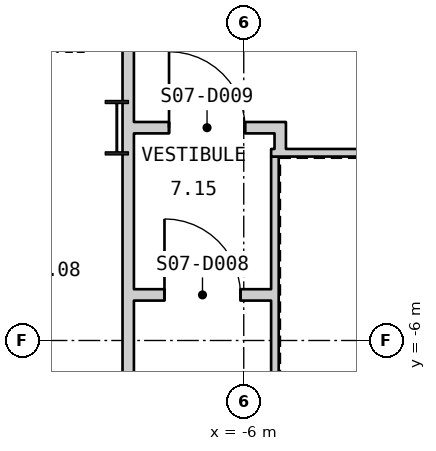
"""IFC4 building model, lengths in metres.
Left out: names, types, materials, properties, quantities, classifications, styles, units other than length and angle.
Written with IfcOpenShell. Run it as: python <this file> out.ifc"""

import sys

from ifc_helpers import new_model, si_unit, direction, frame, frame_2d, origin, origin_2d, place, context, subcontext, project, spatial, polyline, rectangle, i_section, outline, extrude, element, fill, save


model = new_model("IFC4")
c1 = context("Model", 3, precision=1e-05, world=origin(), true_north=direction((0.0, 1.0)))
c2 = subcontext(c1, "Body", "Model", "MODEL_VIEW")
j1 = project(units=[si_unit("LENGTHUNIT", "METRE"), si_unit("PLANEANGLEUNIT", "RADIAN")], contexts=[c1])
p1 = place(None, origin())
s1 = spatial("IfcSite", under=j1, at=p1, CompositionType="ELEMENT")
p2 = place(p1, origin())
s2 = spatial("IfcBuilding", under=s1, at=p2, CompositionType="ELEMENT")
p3 = place(p2, frame((0.0, 0.0, 97.8)))
s3 = spatial("IfcBuildingStorey", under=s2, at=p3, CompositionType="ELEMENT", Elevation=97.8)
p4 = place(p3, frame((-7.67, -3.2, 0.0), z_axis=(0.0, 0.0, 1.0), x_axis=(1.0, 0.0, 0.0)))
e1 = element("IfcColumn", 1, at=p4, inside=s3, PredefinedType="COLUMN", context=c2, shape_type="SweptSolid", body=[
    extrude(i_section(OverallWidth=0.304, OverallDepth=0.716, WebThickness=0.021, FlangeThickness=0.04, at=origin_2d()), origin(), (0.0, 0.0, 1.0), 4.5),
])
p5 = place(p3, frame((-27.775, 11.479, -0.18), z_axis=(0.0, 0.0, 1.0), x_axis=(0.500000711659, -0.866024992908, 0.0)))
e2 = element("IfcWall", 2, at=p5, inside=s3, PredefinedType="SOLIDWALL", context=c2, shape_type="SweptSolid", body=[
    extrude(outline(polyline([(-0.13, -0.225), (45.87, -0.225), (45.61, 0.225), (0.13, 0.225), (-0.13, -0.225)])), origin(), (0.0, 0.0, 1.0), 4.28),
])
p6 = place(p5, frame((1.424, 0.0, 1.08)))
e3 = element("IfcOpeningElement", 3, at=p6, cuts=e2, PredefinedType="OPENING", context=c2, shape_type="SweptSolid", body=[
    extrude(rectangle(XDim=2.4, YDim=2.6, at=frame_2d((1.2, 1.3))), frame((0.0, 0.235, 0.0), z_axis=(0.0, -1.0, 0.0), x_axis=(1.0, 0.0, 0.0)), (0.0, 0.0, 1.0), 0.47),
])
p7 = place(p5, frame((5.893, 0.0, 1.08)))
e4 = element("IfcOpeningElement", 4, at=p7, cuts=e2, PredefinedType="OPENING", context=c2, shape_type="SweptSolid", body=[
    extrude(rectangle(XDim=2.4, YDim=2.6, at=frame_2d((1.2, 1.3))), frame((0.0, 0.235, 0.0), z_axis=(0.0, -1.0, 0.0), x_axis=(1.0, 0.0, 0.0)), (0.0, 0.0, 1.0), 0.47),
])
p8 = place(p5, frame((10.401, 0.0, 1.08)))
e5 = element("IfcOpeningElement", 5, at=p8, cuts=e2, PredefinedType="OPENING", context=c2, shape_type="SweptSolid", body=[
    extrude(rectangle(XDim=2.4, YDim=2.6, at=frame_2d((1.2, 1.3))), frame((0.0, 0.235, 0.0), z_axis=(0.0, -1.0, 0.0), x_axis=(1.0, 0.0, 0.0)), (0.0, 0.0, 1.0), 0.47),
])
p9 = place(p5, frame((14.909, 0.0, 1.08)))
e6 = element("IfcOpeningElement", 6, at=p9, cuts=e2, PredefinedType="OPENING", context=c2, shape_type="SweptSolid", body=[
    extrude(rectangle(XDim=2.4, YDim=2.6, at=frame_2d((1.2, 1.3))), frame((0.0, 0.235, 0.0), z_axis=(0.0, -1.0, 0.0), x_axis=(1.0, 0.0, 0.0)), (0.0, 0.0, 1.0), 0.47),
])
p10 = place(p5, frame((19.416, 0.0, 1.08)))
e7 = element("IfcOpeningElement", 7, at=p10, cuts=e2, PredefinedType="OPENING", context=c2, shape_type="SweptSolid", body=[
    extrude(rectangle(XDim=2.4, YDim=2.6, at=frame_2d((1.2, 1.3))), frame((0.0, 0.235, 0.0), z_axis=(0.0, -1.0, 0.0), x_axis=(1.0, 0.0, 0.0)), (0.0, 0.0, 1.0), 0.47),
])
p11 = place(p5, frame((23.924, 0.0, 1.08)))
e8 = element("IfcOpeningElement", 8, at=p11, cuts=e2, PredefinedType="OPENING", context=c2, shape_type="SweptSolid", body=[
    extrude(rectangle(XDim=2.4, YDim=2.6, at=frame_2d((1.2, 1.3))), frame((0.0, 0.235, 0.0), z_axis=(0.0, -1.0, 0.0), x_axis=(1.0, 0.0, 0.0)), (0.0, 0.0, 1.0), 0.47),
])
p12 = place(p5, frame((28.431, 0.0, 1.08)))
e9 = element("IfcOpeningElement", 9, at=p12, cuts=e2, PredefinedType="OPENING", context=c2, shape_type="SweptSolid", body=[
    extrude(rectangle(XDim=2.4, YDim=2.6, at=frame_2d((1.2, 1.3))), frame((0.0, 0.235, 0.0), z_axis=(0.0, -1.0, 0.0), x_axis=(1.0, 0.0, 0.0)), (0.0, 0.0, 1.0), 0.47),
])
p13 = place(p5, frame((32.939, 0.0, 1.08)))
e10 = element("IfcOpeningElement", 10, at=p13, cuts=e2, PredefinedType="OPENING", context=c2, shape_type="SweptSolid", body=[
    extrude(rectangle(XDim=2.4, YDim=2.6, at=frame_2d((1.2, 1.3))), frame((0.0, 0.235, 0.0), z_axis=(0.0, -1.0, 0.0), x_axis=(1.0, 0.0, 0.0)), (0.0, 0.0, 1.0), 0.47),
])
p14 = place(p5, frame((37.447, 0.0, 1.08)))
e11 = element("IfcOpeningElement", 11, at=p14, cuts=e2, PredefinedType="OPENING", context=c2, shape_type="SweptSolid", body=[
    extrude(rectangle(XDim=2.4, YDim=2.6, at=frame_2d((1.2, 1.3))), frame((0.0, 0.235, 0.0), z_axis=(0.0, -1.0, 0.0), x_axis=(1.0, 0.0, 0.0)), (0.0, 0.0, 1.0), 0.47),
])
p15 = place(p5, frame((41.916, 0.0, 1.08)))
e12 = element("IfcOpeningElement", 12, at=p15, cuts=e2, PredefinedType="OPENING", context=c2, shape_type="SweptSolid", body=[
    extrude(rectangle(XDim=2.4, YDim=2.6, at=frame_2d((1.2, 1.3))), frame((0.0, 0.235, 0.0), z_axis=(0.0, -1.0, 0.0), x_axis=(1.0, 0.0, 0.0)), (0.0, 0.0, 1.0), 0.47),
])
p16 = place(p3, frame((5.64, -3.53, 0.0), z_axis=(0.0, 0.0, 1.0), x_axis=(-1.0, 0.0, 0.0)))
e13 = element("IfcWall", 13, at=p16, inside=s3, PredefinedType="PARTITIONING", context=c2, shape_type="SweptSolid", body=[
    extrude(rectangle(XDim=11.28, YDim=0.1, at=frame_2d((5.64, 0.0))), origin(), (0.0, 0.0, 1.0), 4.3),
])
p17 = place(p3, frame((-5.59, -3.58, 0.0), z_axis=(0.0, 0.0, 1.0), x_axis=(0.0, -1.0, 0.0)))
e14 = element("IfcWall", 14, at=p17, inside=s3, PredefinedType="PARTITIONING", context=c2, shape_type="SweptSolid", body=[
    extrude(rectangle(XDim=8.04, YDim=0.1, at=frame_2d((4.02, 0.0))), origin(), (0.0, 0.0, 1.0), 4.3),
])
p18 = place(p3, frame((-7.52, -13.675, 0.0), z_axis=(0.0, 0.0, 1.0), x_axis=(0.0, 1.0, 0.0)))
e15 = element("IfcWall", 15, at=p18, inside=s3, PredefinedType="PARTITIONING", context=c2, shape_type="SweptSolid", body=[
    extrude(rectangle(XDim=10.167, YDim=0.15, at=frame_2d((5.083, 0.0))), origin(), (0.0, 0.0, 1.0), 3.7),
])
p19 = place(p18, frame((2.079, 0.0, 0.0)))
e16 = element("IfcOpeningElement", 16, at=p19, cuts=e15, PredefinedType="OPENING", context=c2, shape_type="SweptSolid", body=[
    extrude(rectangle(XDim=1.0, YDim=2.1, at=frame_2d((0.5, 1.05))), frame((0.0, 0.085, 0.0), z_axis=(0.0, -1.0, 0.0), x_axis=(1.0, 0.0, 0.0)), (0.0, 0.0, 1.0), 0.17),
])
p20 = place(p3, frame((-7.52, -3.508, 0.0), z_axis=(0.0, 0.0, 1.0), x_axis=(0.0, 1.0, 0.0)))
e17 = element("IfcWall", 17, at=p20, inside=s3, PredefinedType="PARTITIONING", context=c2, shape_type="SweptSolid", body=[
    extrude(rectangle(XDim=1.704, YDim=0.15, at=frame_2d((0.852, 0.0))), origin(), (0.0, 0.0, 1.0), 4.3),
])
p21 = place(p3, frame((-7.445, -5.4, 0.0), z_axis=(0.0, 0.0, 1.0), x_axis=(1.0, 0.0, 0.0)))
e18 = element("IfcWall", 18, at=p21, inside=s3, PredefinedType="PARTITIONING", context=c2, shape_type="SweptSolid", body=[
    extrude(rectangle(XDim=1.805, YDim=0.15, at=frame_2d((0.902, 0.0))), origin(), (0.0, 0.0, 1.0), 4.3),
])
p22 = place(p21, frame((0.402, 0.0, 0.0)))
e19 = element("IfcOpeningElement", 19, at=p22, cuts=e18, PredefinedType="OPENING", context=c2, shape_type="SweptSolid", body=[
    extrude(rectangle(XDim=1.0, YDim=2.1, at=frame_2d((0.5, 1.05))), frame((0.0, 0.085, 0.0), z_axis=(0.0, -1.0, 0.0), x_axis=(1.0, 0.0, 0.0)), (0.0, 0.0, 1.0), 0.17),
])
p23 = place(p3, frame((-7.445, -3.2, 0.0), z_axis=(0.0, 0.0, 1.0), x_axis=(1.0, 0.0, 0.0)))
e20 = element("IfcWall", 20, at=p23, inside=s3, PredefinedType="PARTITIONING", context=c2, shape_type="SweptSolid", body=[
    extrude(rectangle(XDim=2.0, YDim=0.15, at=frame_2d((1.0, 0.0))), origin(), (0.0, 0.0, 1.0), 3.39),
])
p24 = place(p23, frame((0.462, 0.0, 0.0)))
e21 = element("IfcOpeningElement", 21, at=p24, cuts=e20, PredefinedType="OPENING", context=c2, shape_type="SweptSolid", body=[
    extrude(rectangle(XDim=1.0, YDim=2.1, at=frame_2d((0.5, 1.05))), frame((0.0, 0.085, 0.0), z_axis=(0.0, -1.0, 0.0), x_axis=(1.0, 0.0, 0.0)), (0.0, 0.0, 1.0), 0.17),
])
p25 = place(p3, frame((-5.52, -3.48, 0.0), z_axis=(0.0, 0.0, 1.0), x_axis=(0.0, 1.0, 0.0)))
e22 = element("IfcWall", 22, at=p25, inside=s3, PredefinedType="PARTITIONING", context=c2, shape_type="SweptSolid", body=[
    extrude(rectangle(XDim=0.205, YDim=0.15, at=frame_2d((0.102, 0.0))), origin(), (0.0, 0.0, 1.0), 4.3),
])
p26 = place(p22, origin())
e23 = element("IfcDoor", 23, at=p26, inside=s3, OperationType="SINGLE_SWING_RIGHT", PredefinedType="DOOR", context=c2, shape_type="SweptSolid", body=[
    extrude(rectangle(XDim=1.0, YDim=2.1, at=frame_2d((0.5, 1.05))), frame((0.0, 0.025, 0.0), z_axis=(0.0, -1.0, 0.0), x_axis=(1.0, 0.0, 0.0)), (0.0, 0.0, 1.0), 0.05),
])
fill(e19, e23)
p27 = place(p24, origin())
e24 = element("IfcDoor", 24, at=p27, inside=s3, OperationType="SINGLE_SWING_RIGHT", PredefinedType="DOOR", context=c2, shape_type="SweptSolid", body=[
    extrude(rectangle(XDim=1.0, YDim=2.1, at=frame_2d((0.5, 1.05))), frame((0.0, 0.025, 0.0), z_axis=(0.0, -1.0, 0.0), x_axis=(1.0, 0.0, 0.0)), (0.0, 0.0, 1.0), 0.05),
])
fill(e21, e24)
save(model, sys.argv[1])
